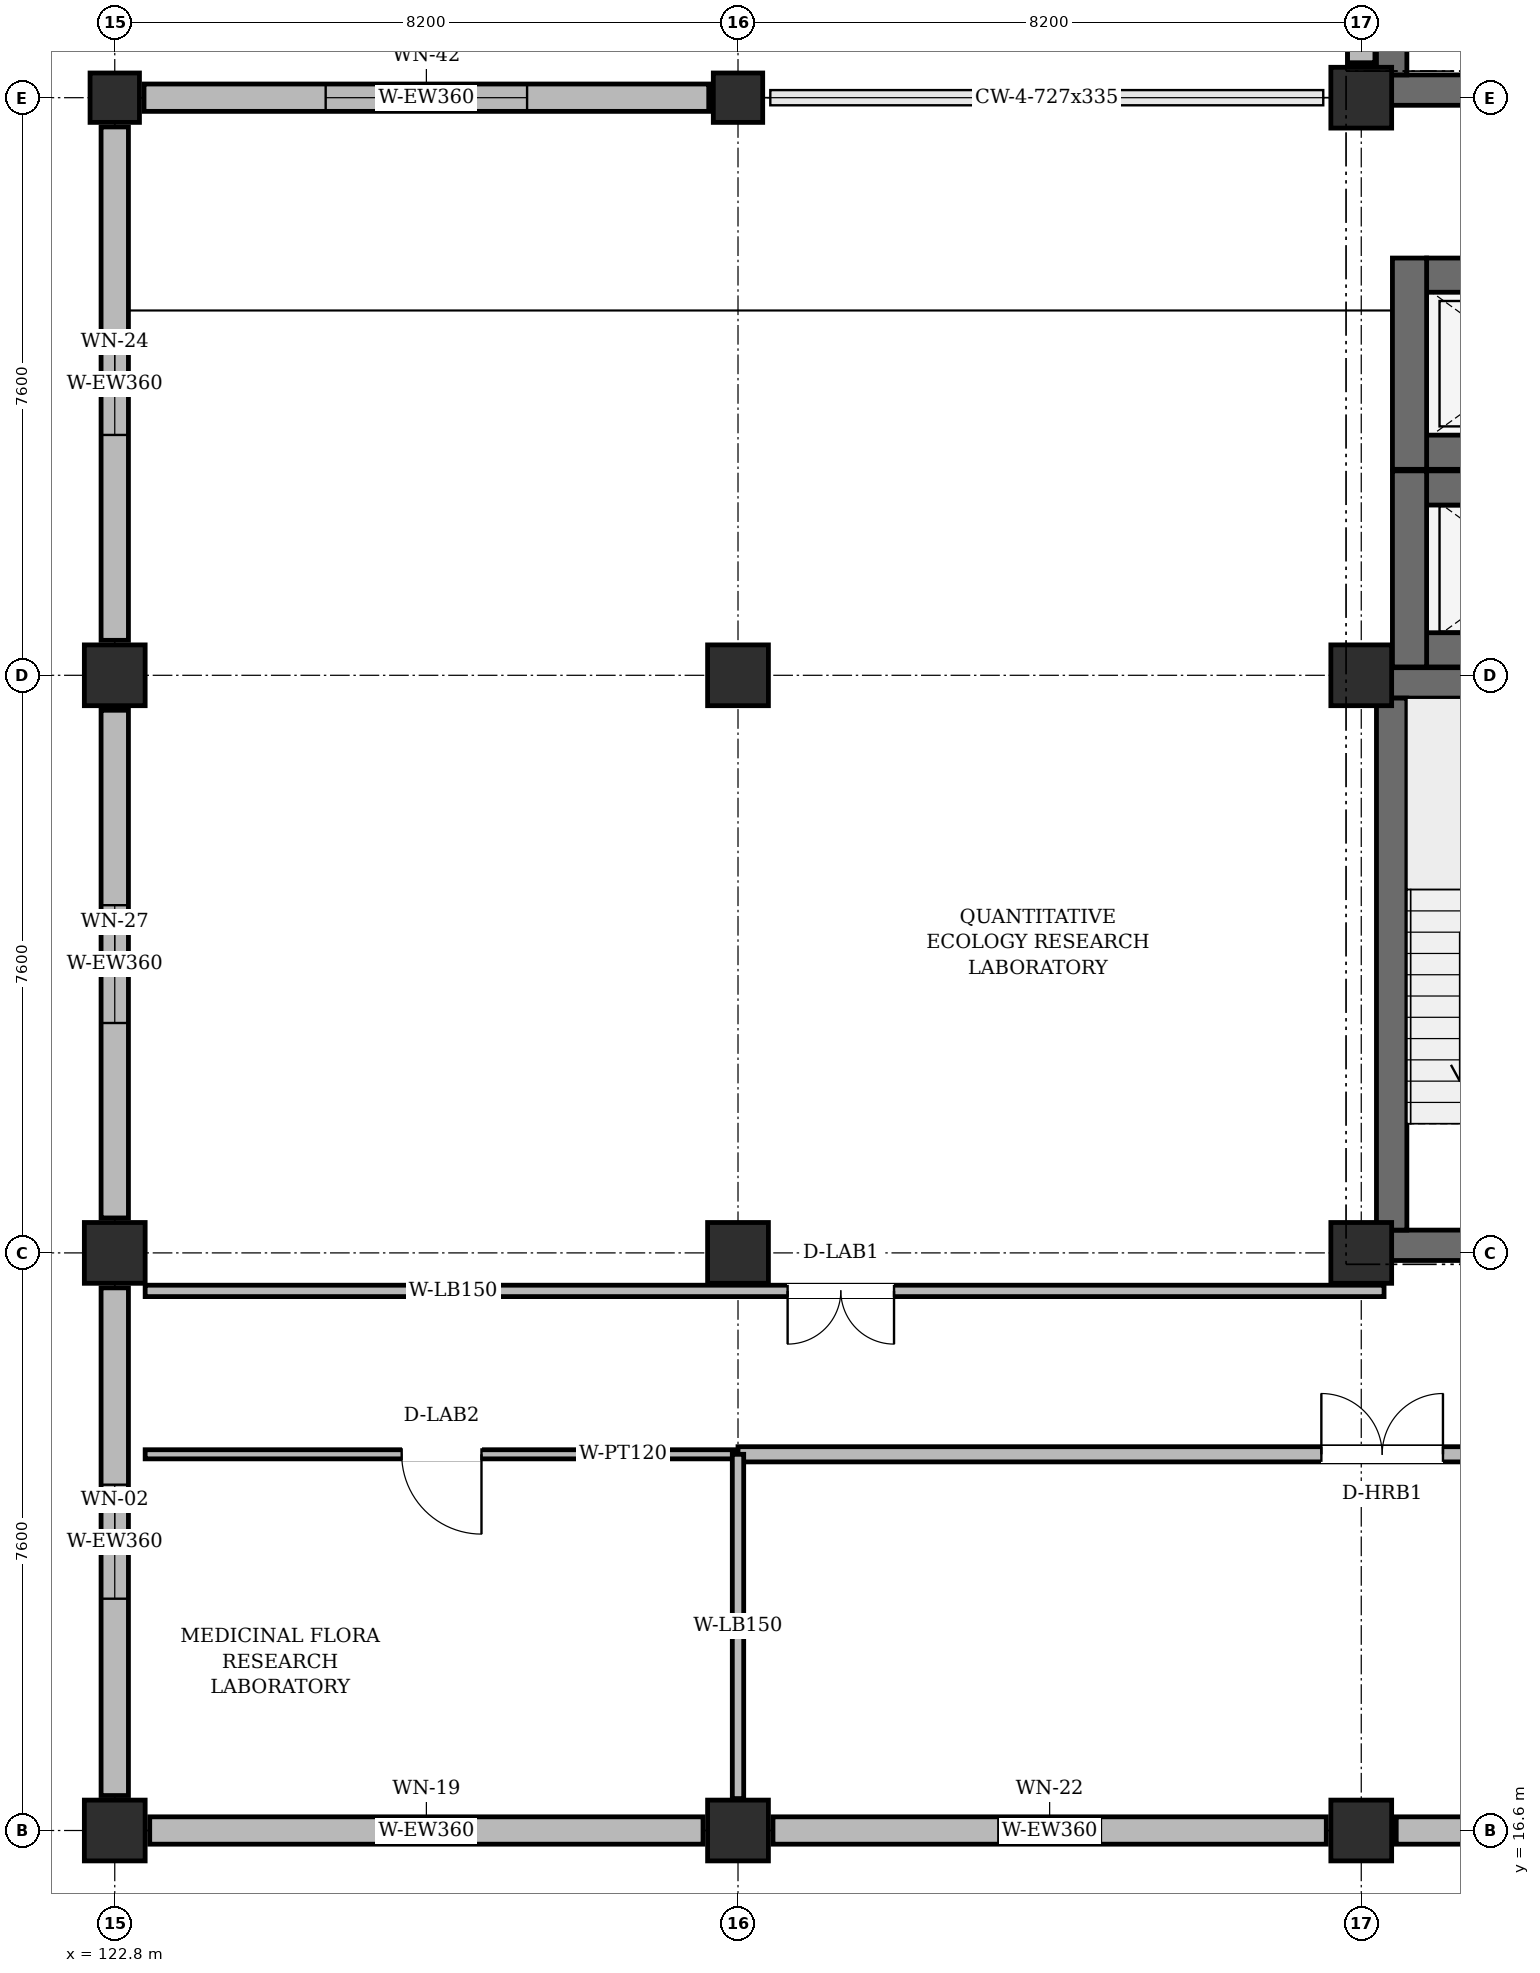
"""IFC4 building model, lengths in metres.
Left out: names, types, materials, properties, quantities, classifications, styles, units other than length and angle.
Written with IfcOpenShell. Run it as: python <this file> out.ifc"""

import sys

from ifc_helpers import new_model, si_unit, direction, frame, frame_2d, origin, origin_2d, place, context, subcontext, project, spatial, rectangle, extrude, element, fill, save


model = new_model("IFC4")
c1 = context("Model", 3, precision=1e-05, world=origin(), true_north=direction((0.0, 1.0)))
c2 = subcontext(c1, "Body", "Model", "MODEL_VIEW")
j1 = project(units=[si_unit("LENGTHUNIT", "METRE"), si_unit("PLANEANGLEUNIT", "RADIAN")], contexts=[c1])
p1 = place(None, origin())
s1 = spatial("IfcSite", under=j1, at=p1, CompositionType="ELEMENT")
p2 = place(p1, origin())
s2 = spatial("IfcBuilding", under=s1, at=p2, CompositionType="ELEMENT")
p3 = place(p2, frame((0.0, 0.0, 45.0)))
s3 = spatial("IfcBuildingStorey", under=s2, at=p3, CompositionType="ELEMENT", Elevation=45.0)
for number, where, z_axis, x_axis in (
    (1, (122.8, 16.6, 0.0), (0.0, 0.0, 1.0), (1.0, 0.0, 0.0)),
    (2, (122.8, 24.2, 0.0), (0.0, 0.0, 1.0), (1.0, 0.0, 0.0)),
    (3, (122.8, 31.8, 0.0), (0.0, 0.0, 1.0), (1.0, 0.0, 0.0)),
):
    element("IfcColumn", number, at=place(p3, frame(where, z_axis=z_axis, x_axis=x_axis)), inside=s3, PredefinedType="COLUMN", context=c2, shape_type="SweptSolid", body=[
        extrude(rectangle(XDim=0.8, YDim=0.8, at=origin_2d()), origin(), (0.0, 0.0, 1.0), 3.95),
    ])
p4 = place(p3, frame((122.8, 39.4, 0.0), z_axis=(0.0, 0.0, 1.0), x_axis=(1.0, 0.0, 0.0)))
e4 = element("IfcColumn", 4, at=p4, inside=s3, PredefinedType="COLUMN", context=c2, shape_type="SweptSolid", body=[
    extrude(rectangle(XDim=0.65, YDim=0.65, at=origin_2d()), origin(), (0.0, 0.0, 1.0), 3.95),
])
for number, where, z_axis, x_axis in (
    (5, (131.0, 16.6, 0.0), (0.0, 0.0, 1.0), (1.0, 0.0, 0.0)),
    (6, (131.0, 24.2, 0.0), (0.0, 0.0, 1.0), (1.0, 0.0, 0.0)),
    (7, (131.0, 31.8, 0.0), (0.0, 0.0, 1.0), (1.0, 0.0, 0.0)),
):
    element("IfcColumn", number, at=place(p3, frame(where, z_axis=z_axis, x_axis=x_axis)), inside=s3, PredefinedType="COLUMN", context=c2, shape_type="SweptSolid", body=[
        extrude(rectangle(XDim=0.8, YDim=0.8, at=origin_2d()), origin(), (0.0, 0.0, 1.0), 3.95),
    ])
p5 = place(p3, frame((131.0, 39.4, 0.0), z_axis=(0.0, 0.0, 1.0), x_axis=(1.0, 0.0, 0.0)))
e8 = element("IfcColumn", 8, at=p5, inside=s3, PredefinedType="COLUMN", context=c2, shape_type="SweptSolid", body=[
    extrude(rectangle(XDim=0.65, YDim=0.65, at=origin_2d()), origin(), (0.0, 0.0, 1.0), 3.95),
])
for number, where, z_axis, x_axis in (
    (9, (139.2, 16.6, 0.0), (0.0, 0.0, 1.0), (1.0, 0.0, 0.0)),
    (10, (139.2, 24.2, 0.0), (0.0, 0.0, 1.0), (1.0, 0.0, 0.0)),
    (11, (139.2, 31.8, 0.0), (0.0, 0.0, 1.0), (1.0, 0.0, 0.0)),
    (12, (139.2, 39.4, 0.0), (0.0, 0.0, 1.0), (1.0, 0.0, 0.0)),
):
    element("IfcColumn", number, at=place(p3, frame(where, z_axis=z_axis, x_axis=x_axis)), inside=s3, PredefinedType="COLUMN", context=c2, shape_type="SweptSolid", body=[
        extrude(rectangle(XDim=0.8, YDim=0.8, at=origin_2d()), origin(), (0.0, 0.0, 1.0), 3.95),
    ])
p6 = place(p3, frame((123.26, 16.6, 0.0), z_axis=(0.0, 0.0, 1.0), x_axis=(1.0, 0.0, 0.0)))
e13 = element("IfcWall", 13, at=p6, inside=s3, PredefinedType="SOLIDWALL", context=c2, shape_type="SweptSolid", body=[
    extrude(rectangle(XDim=7.28, YDim=0.36, at=frame_2d((3.64, 0.0))), origin(), (0.0, 0.0, 1.0), 3.335),
])
p7 = place(p6, frame((3.065, 0.0, 0.95)))
e14 = element("IfcOpeningElement", 14, at=p7, cuts=e13, PredefinedType="OPENING", context=c2, shape_type="SweptSolid", body=[
    extrude(rectangle(XDim=1.15, YDim=1.75, at=frame_2d((0.575, 0.875))), frame((0.0, 0.192, 0.0), z_axis=(0.0, -1.0, 0.0), x_axis=(1.0, 0.0, 0.0)), (0.0, 0.0, 1.0), 0.384),
])
p8 = place(p3, frame((131.46, 16.6, 0.0), z_axis=(0.0, 0.0, 1.0), x_axis=(1.0, 0.0, 0.0)))
e15 = element("IfcWall", 15, at=p8, inside=s3, PredefinedType="SOLIDWALL", context=c2, shape_type="SweptSolid", body=[
    extrude(rectangle(XDim=7.28, YDim=0.36, at=frame_2d((3.64, 0.0))), origin(), (0.0, 0.0, 1.0), 3.335),
])
p9 = place(p8, frame((2.965, 0.0, 0.95)))
e16 = element("IfcOpeningElement", 16, at=p9, cuts=e15, PredefinedType="OPENING", context=c2, shape_type="SweptSolid", body=[
    extrude(rectangle(XDim=1.35, YDim=1.5, at=frame_2d((0.675, 0.75))), frame((0.0, 0.192, 0.0), z_axis=(0.0, -1.0, 0.0), x_axis=(1.0, 0.0, 0.0)), (0.0, 0.0, 1.0), 0.384),
])
p10 = place(p3, frame((139.66, 16.6, 0.0), z_axis=(0.0, 0.0, 1.0), x_axis=(1.0, 0.0, 0.0)))
e17 = element("IfcWall", 17, at=p10, inside=s3, PredefinedType="SOLIDWALL", context=c2, shape_type="SweptSolid", body=[
    extrude(rectangle(XDim=7.28, YDim=0.36, at=frame_2d((3.64, 0.0))), origin(), (0.0, 0.0, 1.0), 3.335),
])
p11 = place(p10, frame((2.865, 0.0, 0.95)))
e18 = element("IfcOpeningElement", 18, at=p11, cuts=e17, PredefinedType="OPENING", context=c2, shape_type="SweptSolid", body=[
    extrude(rectangle(XDim=1.55, YDim=1.25, at=frame_2d((0.775, 0.625))), frame((0.0, 0.192, 0.0), z_axis=(0.0, -1.0, 0.0), x_axis=(1.0, 0.0, 0.0)), (0.0, 0.0, 1.0), 0.384),
])
p12 = place(p3, frame((139.2, 46.54, 0.0), z_axis=(0.0, 0.0, 1.0), x_axis=(0.0, -1.0, 0.0)))
e19 = element("IfcWall", 19, at=p12, inside=s3, PredefinedType="SOLIDWALL", context=c2, shape_type="SweptSolid", body=[
    extrude(rectangle(XDim=6.68, YDim=0.36, at=frame_2d((3.34, 0.0))), origin(), (0.0, 0.0, 1.0), 3.335),
])
p13 = place(p3, frame((130.615, 39.4, 0.0), z_axis=(0.0, 0.0, 1.0), x_axis=(-1.0, 0.0, 0.0)))
e20 = element("IfcWall", 20, at=p13, inside=s3, PredefinedType="SOLIDWALL", context=c2, shape_type="SweptSolid", body=[
    extrude(rectangle(XDim=7.43, YDim=0.36, at=frame_2d((3.715, 0.0))), origin(), (0.0, 0.0, 1.0), 3.335),
])
p14 = place(p13, frame((2.39, 0.0, 0.95)))
e21 = element("IfcOpeningElement", 21, at=p14, cuts=e20, PredefinedType="OPENING", context=c2, shape_type="SweptSolid", body=[
    extrude(rectangle(XDim=2.65, YDim=1.5, at=frame_2d((1.325, 0.75))), frame((0.0, 0.192, 0.0), z_axis=(0.0, -1.0, 0.0), x_axis=(1.0, 0.0, 0.0)), (0.0, 0.0, 1.0), 0.384),
])
p15 = place(p3, frame((122.8, 39.015, 0.0), z_axis=(0.0, 0.0, 1.0), x_axis=(0.0, -1.0, 0.0)))
e22 = element("IfcWall", 22, at=p15, inside=s3, PredefinedType="SOLIDWALL", context=c2, shape_type="SweptSolid", body=[
    extrude(rectangle(XDim=6.755, YDim=0.36, at=frame_2d((3.377, 0.0))), origin(), (0.0, 0.0, 1.0), 3.335),
])
p16 = place(p15, frame((2.702, 0.0, 0.95)))
e23 = element("IfcOpeningElement", 23, at=p16, cuts=e22, PredefinedType="OPENING", context=c2, shape_type="SweptSolid", body=[
    extrude(rectangle(XDim=1.35, YDim=2.05, at=frame_2d((0.675, 1.025))), frame((0.0, 0.192, 0.0), z_axis=(0.0, -1.0, 0.0), x_axis=(1.0, 0.0, 0.0)), (0.0, 0.0, 1.0), 0.384),
])
p17 = place(p3, frame((122.8, 31.34, 0.0), z_axis=(0.0, 0.0, 1.0), x_axis=(0.0, -1.0, 0.0)))
e24 = element("IfcWall", 24, at=p17, inside=s3, PredefinedType="SOLIDWALL", context=c2, shape_type="SweptSolid", body=[
    extrude(rectangle(XDim=6.68, YDim=0.36, at=frame_2d((3.34, 0.0))), origin(), (0.0, 0.0, 1.0), 3.335),
])
p18 = place(p17, frame((2.565, 0.0, 0.95)))
e25 = element("IfcOpeningElement", 25, at=p18, cuts=e24, PredefinedType="OPENING", context=c2, shape_type="SweptSolid", body=[
    extrude(rectangle(XDim=1.55, YDim=1.75, at=frame_2d((0.775, 0.875))), frame((0.0, 0.192, 0.0), z_axis=(0.0, -1.0, 0.0), x_axis=(1.0, 0.0, 0.0)), (0.0, 0.0, 1.0), 0.384),
])
p19 = place(p3, frame((122.8, 23.74, 0.0), z_axis=(0.0, 0.0, 1.0), x_axis=(0.0, -1.0, 0.0)))
e26 = element("IfcWall", 26, at=p19, inside=s3, PredefinedType="SOLIDWALL", context=c2, shape_type="SweptSolid", body=[
    extrude(rectangle(XDim=6.68, YDim=0.36, at=frame_2d((3.34, 0.0))), origin(), (0.0, 0.0, 1.0), 3.335),
])
p20 = place(p19, frame((2.59, 0.0, 0.95)))
e27 = element("IfcOpeningElement", 27, at=p20, cuts=e26, PredefinedType="OPENING", context=c2, shape_type="SweptSolid", body=[
    extrude(rectangle(XDim=1.5, YDim=2.1, at=frame_2d((0.75, 1.05))), frame((0.0, 0.192, 0.0), z_axis=(0.0, -1.0, 0.0), x_axis=(1.0, 0.0, 0.0)), (0.0, 0.0, 1.0), 0.384),
])
p21 = place(p3, frame((139.4, 24.3, 0.0), z_axis=(0.0, 0.0, 1.0), x_axis=(1.0, 0.0, 0.0)))
e28 = element("IfcWall", 28, at=p21, inside=s3, PredefinedType="SHEAR", context=c2, shape_type="SweptSolid", body=[
    extrude(rectangle(XDim=3.8, YDim=0.4, at=frame_2d((1.9, 0.0))), origin(), (0.0, 0.0, 1.0), 3.95),
])
p22 = place(p21, frame((1.3, 0.0, 0.0)))
e29 = element("IfcOpeningElement", 29, at=p22, cuts=e28, PredefinedType="OPENING", context=c2, shape_type="SweptSolid", body=[
    extrude(rectangle(XDim=1.2, YDim=2.2, at=frame_2d((0.6, 1.1))), frame((0.0, 0.212, 0.0), z_axis=(0.0, -1.0, 0.0), x_axis=(1.0, 0.0, 0.0)), (0.0, 0.0, 1.0), 0.424),
])
p23 = place(p3, frame((139.4, 31.7, 0.0), z_axis=(0.0, 0.0, 1.0), x_axis=(1.0, 0.0, 0.0)))
e30 = element("IfcWall", 30, at=p23, inside=s3, PredefinedType="SHEAR", context=c2, shape_type="SweptSolid", body=[
    extrude(rectangle(XDim=3.8, YDim=0.4, at=frame_2d((1.9, 0.0))), origin(), (0.0, 0.0, 1.0), 3.95),
])
p24 = place(p3, frame((139.6, 24.5, 0.0), z_axis=(0.0, 0.0, 1.0), x_axis=(0.0, 1.0, 0.0)))
e31 = element("IfcWall", 31, at=p24, inside=s3, PredefinedType="SHEAR", context=c2, shape_type="SweptSolid", body=[
    extrude(rectangle(XDim=7.0, YDim=0.4, at=frame_2d((3.5, 0.0))), origin(), (0.0, 0.0, 1.0), 3.95),
])
p25 = place(p3, frame((139.4, 39.5, 0.0), z_axis=(0.0, 0.0, 1.0), x_axis=(1.0, 0.0, 0.0)))
e32 = element("IfcWall", 32, at=p25, inside=s3, PredefinedType="SHEAR", context=c2, shape_type="SweptSolid", body=[
    extrude(rectangle(XDim=3.8, YDim=0.4, at=frame_2d((1.9, 0.0))), origin(), (0.0, 0.0, 1.0), 3.95),
])
p26 = place(p25, frame((1.3, 0.0, 0.0)))
e33 = element("IfcOpeningElement", 33, at=p26, cuts=e32, PredefinedType="OPENING", context=c2, shape_type="SweptSolid", body=[
    extrude(rectangle(XDim=1.2, YDim=2.2, at=frame_2d((0.6, 1.1))), frame((0.0, 0.212, 0.0), z_axis=(0.0, -1.0, 0.0), x_axis=(1.0, 0.0, 0.0)), (0.0, 0.0, 1.0), 0.424),
])
p27 = place(p3, frame((139.6, 39.7, 0.0), z_axis=(0.0, 0.0, 1.0), x_axis=(0.0, 1.0, 0.0)))
e34 = element("IfcWall", 34, at=p27, inside=s3, PredefinedType="SHEAR", context=c2, shape_type="SweptSolid", body=[
    extrude(rectangle(XDim=7.0, YDim=0.4, at=frame_2d((3.5, 0.0))), origin(), (0.0, 0.0, 1.0), 3.95),
])
for number, where, z_axis, x_axis in (
    (35, (140.06, 32.135, 0.0), (0.0, 0.0, 1.0), (1.0, 0.0, 0.0)),
    (36, (140.06, 34.265, 0.0), (0.0, 0.0, 1.0), (1.0, 0.0, 0.0)),
):
    element("IfcWall", number, at=place(p3, frame(where, z_axis=z_axis, x_axis=x_axis)), inside=s3, PredefinedType="SHEAR", context=c2, shape_type="SweptSolid", body=[
        extrude(rectangle(XDim=2.74, YDim=0.45, at=frame_2d((1.37, 0.0))), origin(), (0.0, 0.0, 1.0), 3.95),
    ])
p28 = place(p3, frame((139.835, 31.91, 0.0), z_axis=(0.0, 0.0, 1.0), x_axis=(0.0, 1.0, 0.0)))
e37 = element("IfcWall", 37, at=p28, inside=s3, PredefinedType="SHEAR", context=c2, shape_type="SweptSolid", body=[
    extrude(rectangle(XDim=2.58, YDim=0.45, at=frame_2d((1.29, 0.0))), origin(), (0.0, 0.0, 1.0), 3.95),
])
for number, where, z_axis, x_axis in (
    (38, (140.06, 34.735, 0.0), (0.0, 0.0, 1.0), (1.0, 0.0, 0.0)),
    (39, (140.06, 37.065, 0.0), (0.0, 0.0, 1.0), (1.0, 0.0, 0.0)),
):
    element("IfcWall", number, at=place(p3, frame(where, z_axis=z_axis, x_axis=x_axis)), inside=s3, PredefinedType="SHEAR", context=c2, shape_type="SweptSolid", body=[
        extrude(rectangle(XDim=2.74, YDim=0.45, at=frame_2d((1.37, 0.0))), origin(), (0.0, 0.0, 1.0), 3.95),
    ])
p29 = place(p3, frame((139.835, 34.51, 0.0), z_axis=(0.0, 0.0, 1.0), x_axis=(0.0, 1.0, 0.0)))
e40 = element("IfcWall", 40, at=p29, inside=s3, PredefinedType="SHEAR", context=c2, shape_type="SweptSolid", body=[
    extrude(rectangle(XDim=2.78, YDim=0.45, at=frame_2d((1.39, 0.0))), origin(), (0.0, 0.0, 1.0), 3.95),
])
p30 = place(p3, frame((131.0, 21.55, 0.0), z_axis=(0.0, 0.0, 1.0), x_axis=(-1.0, 0.0, 0.0)))
e41 = element("IfcWall", 41, at=p30, inside=s3, PredefinedType="PARTITIONING", context=c2, shape_type="SweptSolid", body=[
    extrude(rectangle(XDim=7.8, YDim=0.12, at=frame_2d((3.9, 0.0))), origin(), (0.0, 0.0, 1.0), 3.625),
])
p31 = place(p30, frame((3.375, 0.0, 0.0)))
e42 = element("IfcOpeningElement", 42, at=p31, cuts=e41, PredefinedType="OPENING", context=c2, shape_type="SweptSolid", body=[
    extrude(rectangle(XDim=1.05, YDim=2.2, at=frame_2d((0.525, 1.1))), frame((0.0, 0.072, 0.0), z_axis=(0.0, -1.0, 0.0), x_axis=(1.0, 0.0, 0.0)), (0.0, 0.0, 1.0), 0.144),
])
p32 = place(p3, frame((147.95, 21.55, 0.0), z_axis=(0.0, 0.0, 1.0), x_axis=(-1.0, 0.0, 0.0)))
e43 = element("IfcWall", 43, at=p32, inside=s3, PredefinedType="PARTITIONING", context=c2, shape_type="SweptSolid", body=[
    extrude(rectangle(XDim=16.95, YDim=0.2, at=frame_2d((8.475, 0.0))), origin(), (0.0, 0.0, 1.0), 3.525),
])
p33 = place(p32, frame((7.675, 0.0, 0.0)))
e44 = element("IfcOpeningElement", 44, at=p33, cuts=e43, PredefinedType="OPENING", context=c2, shape_type="SweptSolid", body=[
    extrude(rectangle(XDim=1.6, YDim=2.3, at=frame_2d((0.8, 1.15))), frame((0.0, 0.112, 0.0), z_axis=(0.0, -1.0, 0.0), x_axis=(1.0, 0.0, 0.0)), (0.0, 0.0, 1.0), 0.224),
])
p34 = place(p3, frame((123.2, 23.7, 0.0), z_axis=(0.0, 0.0, 1.0), x_axis=(1.0, 0.0, 0.0)))
e45 = element("IfcWall", 45, at=p34, inside=s3, PredefinedType="PARTITIONING", context=c2, shape_type="SweptSolid", body=[
    extrude(rectangle(XDim=16.3, YDim=0.15, at=frame_2d((8.15, 0.0))), origin(), (0.0, 0.0, 1.0), 3.805),
])
p35 = place(p34, frame((8.453, 0.0, 0.0)))
e46 = element("IfcOpeningElement", 46, at=p35, cuts=e45, PredefinedType="OPENING", context=c2, shape_type="SweptSolid", body=[
    extrude(rectangle(XDim=1.4, YDim=2.2, at=frame_2d((0.7, 1.1))), frame((0.0, 0.087, 0.0), z_axis=(0.0, -1.0, 0.0), x_axis=(1.0, 0.0, 0.0)), (0.0, 0.0, 1.0), 0.174),
])
p36 = place(p3, frame((131.0, 21.55, 0.0), z_axis=(0.0, 0.0, 1.0), x_axis=(0.0, -1.0, 0.0)))
e47 = element("IfcWall", 47, at=p36, inside=s3, PredefinedType="PARTITIONING", context=c2, shape_type="SweptSolid", body=[
    extrude(rectangle(XDim=4.53, YDim=0.15, at=frame_2d((2.265, 0.0))), origin(), (0.0, 0.0, 1.0), 3.285),
])
p37 = place(p7, origin())
e48 = element("IfcWindow", 48, at=p37, inside=s3, PartitioningType="SINGLE_PANEL", PredefinedType="WINDOW", context=c2, shape_type="SweptSolid", body=[
    extrude(rectangle(XDim=1.15, YDim=1.75, at=frame_2d((0.575, 0.875))), frame((0.0, 0.03, 0.0), z_axis=(0.0, -1.0, 0.0), x_axis=(1.0, 0.0, 0.0)), (0.0, 0.0, 1.0), 0.06),
])
fill(e14, e48)
p38 = place(p9, origin())
e49 = element("IfcWindow", 49, at=p38, inside=s3, PartitioningType="SINGLE_PANEL", PredefinedType="WINDOW", context=c2, shape_type="SweptSolid", body=[
    extrude(rectangle(XDim=1.35, YDim=1.5, at=frame_2d((0.675, 0.75))), frame((0.0, 0.03, 0.0), z_axis=(0.0, -1.0, 0.0), x_axis=(1.0, 0.0, 0.0)), (0.0, 0.0, 1.0), 0.06),
])
fill(e16, e49)
p39 = place(p14, origin())
e50 = element("IfcWindow", 50, at=p39, inside=s3, PartitioningType="DOUBLE_PANEL_VERTICAL", PredefinedType="WINDOW", context=c2, shape_type="SweptSolid", body=[
    extrude(rectangle(XDim=2.65, YDim=1.5, at=frame_2d((1.325, 0.75))), frame((0.0, 0.03, 0.0), z_axis=(0.0, -1.0, 0.0), x_axis=(1.0, 0.0, 0.0)), (0.0, 0.0, 1.0), 0.06),
])
fill(e21, e50)
p40 = place(p16, origin())
e51 = element("IfcWindow", 51, at=p40, inside=s3, PartitioningType="SINGLE_PANEL", PredefinedType="WINDOW", context=c2, shape_type="SweptSolid", body=[
    extrude(rectangle(XDim=1.35, YDim=2.05, at=frame_2d((0.675, 1.025))), frame((0.0, 0.03, 0.0), z_axis=(0.0, -1.0, 0.0), x_axis=(1.0, 0.0, 0.0)), (0.0, 0.0, 1.0), 0.06),
])
fill(e23, e51)
p41 = place(p18, origin())
e52 = element("IfcWindow", 52, at=p41, inside=s3, PartitioningType="DOUBLE_PANEL_VERTICAL", PredefinedType="WINDOW", context=c2, shape_type="SweptSolid", body=[
    extrude(rectangle(XDim=1.55, YDim=1.75, at=frame_2d((0.775, 0.875))), frame((0.0, 0.03, 0.0), z_axis=(0.0, -1.0, 0.0), x_axis=(1.0, 0.0, 0.0)), (0.0, 0.0, 1.0), 0.06),
])
fill(e25, e52)
p42 = place(p20, origin())
e53 = element("IfcWindow", 53, at=p42, inside=s3, PartitioningType="DOUBLE_PANEL_VERTICAL", PredefinedType="WINDOW", context=c2, shape_type="SweptSolid", body=[
    extrude(rectangle(XDim=1.5, YDim=2.1, at=frame_2d((0.75, 1.05))), frame((0.0, 0.03, 0.0), z_axis=(0.0, -1.0, 0.0), x_axis=(1.0, 0.0, 0.0)), (0.0, 0.0, 1.0), 0.06),
])
fill(e27, e53)
p43 = place(p31, origin())
e54 = element("IfcDoor", 54, at=p43, inside=s3, OperationType="SINGLE_SWING_LEFT", PredefinedType="DOOR", context=c2, shape_type="SweptSolid", body=[
    extrude(rectangle(XDim=1.05, YDim=2.2, at=frame_2d((0.525, 1.1))), frame((0.0, 0.025, 0.0), z_axis=(0.0, -1.0, 0.0), x_axis=(1.0, 0.0, 0.0)), (0.0, 0.0, 1.0), 0.05),
])
fill(e42, e54)
p44 = place(p33, frame((1.6, 0.0, 0.0), z_axis=(0.0, 0.0, 1.0), x_axis=(-1.0, 0.0, 0.0)))
e55 = element("IfcDoor", 55, at=p44, inside=s3, OperationType="DOUBLE_DOOR_SINGLE_SWING", PredefinedType="DOOR", context=c2, shape_type="SweptSolid", body=[
    extrude(rectangle(XDim=1.6, YDim=2.3, at=frame_2d((0.8, 1.15))), frame((0.0, 0.025, 0.0), z_axis=(0.0, -1.0, 0.0), x_axis=(1.0, 0.0, 0.0)), (0.0, 0.0, 1.0), 0.05),
])
fill(e44, e55)
p45 = place(p35, frame((1.4, 0.0, 0.0), z_axis=(0.0, 0.0, 1.0), x_axis=(-1.0, 0.0, 0.0)))
e56 = element("IfcDoor", 56, at=p45, inside=s3, OperationType="DOUBLE_DOOR_SINGLE_SWING", PredefinedType="DOOR", context=c2, shape_type="SweptSolid", body=[
    extrude(rectangle(XDim=1.4, YDim=2.2, at=frame_2d((0.7, 1.1))), frame((0.0, 0.025, 0.0), z_axis=(0.0, -1.0, 0.0), x_axis=(1.0, 0.0, 0.0)), (0.0, 0.0, 1.0), 0.05),
])
fill(e46, e56)
save(model, sys.argv[1])
